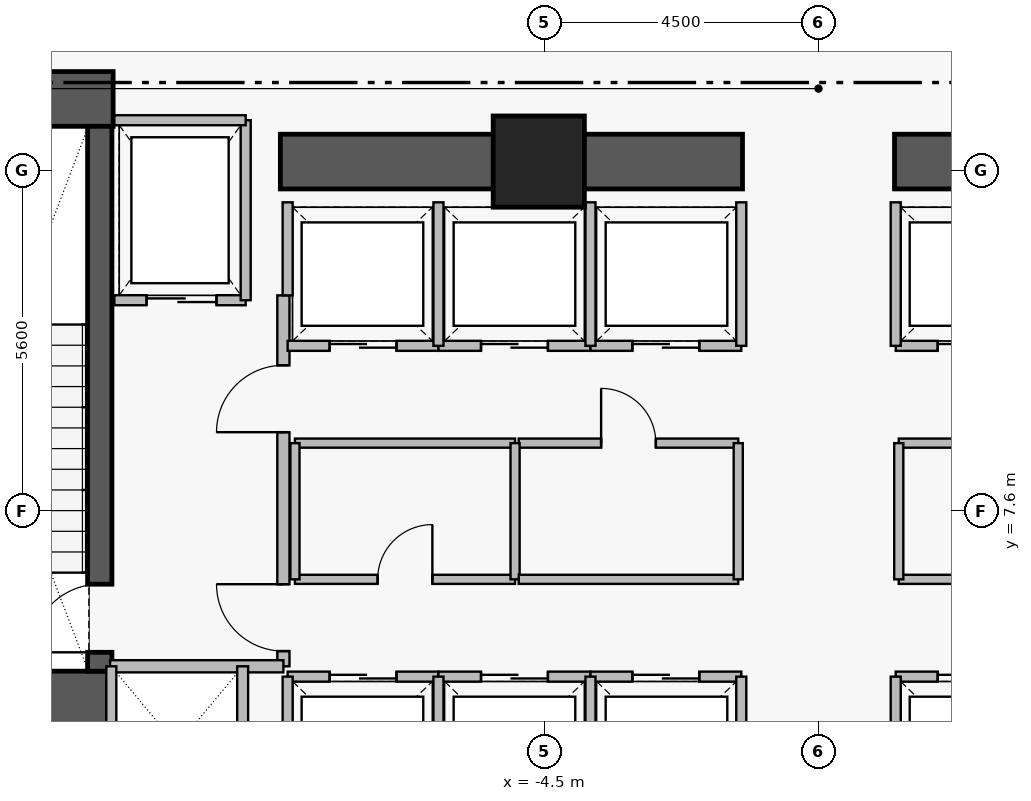
"""IFC4 building model, lengths in metres.
Left out: names, types, materials, properties, quantities, classifications, styles, units other than length and angle.
Written with IfcOpenShell. Run it as: python <this file> out.ifc"""

import sys

from ifc_helpers import new_model, si_unit, direction, frame, frame_2d, origin, origin_2d, place, context, subcontext, project, spatial, rectangle, extrude, element, fill, save


model = new_model("IFC4")
c1 = context("Model", 3, precision=1e-05, world=origin(), true_north=direction((0.0, 1.0)))
c2 = subcontext(c1, "Body", "Model", "MODEL_VIEW")
j1 = project(units=[si_unit("LENGTHUNIT", "METRE"), si_unit("PLANEANGLEUNIT", "RADIAN")], contexts=[c1])
p1 = place(None, origin())
s1 = spatial("IfcSite", under=j1, at=p1, CompositionType="ELEMENT")
p2 = place(p1, origin())
s2 = spatial("IfcBuilding", under=s1, at=p2, CompositionType="ELEMENT")
p3 = place(p2, frame((0.0, 0.0, 18.0)))
s3 = spatial("IfcBuildingStorey", under=s2, at=p3, CompositionType="ELEMENT", Elevation=18.0)
for number, where, z_axis, x_axis in (
    (1, (-16.31, 14.38, 0.0), (0.0, 0.0, 1.0), (1.0, 0.0, 0.0)),
    (2, (-16.31, 4.52, 0.0), (0.0, 0.0, 1.0), (1.0, 0.0, 0.0)),
):
    element("IfcWall", number, at=place(p3, frame(where, z_axis=z_axis, x_axis=x_axis)), inside=s3, PredefinedType="SHEAR", context=c2, shape_type="SweptSolid", body=[
        extrude(rectangle(XDim=4.71, YDim=0.9, at=frame_2d((2.355, 0.0))), origin(), (0.0, 0.0, 1.0), 4.61),
    ])
for number, where, z_axis, x_axis in (
    (3, (-8.85, 13.35, 0.0), (0.0, 0.0, 1.0), (1.0, 0.0, 0.0)),
    (4, (1.25, 13.35, 0.0), (0.0, 0.0, 1.0), (1.0, 0.0, 0.0)),
):
    element("IfcWall", number, at=place(p3, frame(where, z_axis=z_axis, x_axis=x_axis)), inside=s3, PredefinedType="SHEAR", context=c2, shape_type="SweptSolid", body=[
        extrude(rectangle(XDim=7.6, YDim=0.9, at=frame_2d((3.8, 0.0))), origin(), (0.0, 0.0, 1.0), 4.54),
    ])
p4 = place(p3, frame((-11.82, 4.97, 0.0), z_axis=(0.0, 0.0, 1.0), x_axis=(0.0, 1.0, 0.0)))
e5 = element("IfcWall", 5, at=p4, inside=s3, PredefinedType="SHEAR", context=c2, shape_type="SweptSolid", body=[
    extrude(rectangle(XDim=8.96, YDim=0.4, at=frame_2d((4.48, 0.0))), origin(), (0.0, 0.0, 1.0), 4.61),
])
p5 = place(p4, frame((0.31, 0.0, 0.0)))
e6 = element("IfcOpeningElement", 6, at=p5, cuts=e5, PredefinedType="OPENING", context=c2, shape_type="SweptSolid", body=[
    extrude(rectangle(XDim=1.12, YDim=2.22, at=frame_2d((0.56, 1.11))), frame((0.0, 0.21, 0.0), z_axis=(0.0, -1.0, 0.0), x_axis=(1.0, 0.0, 0.0)), (0.0, 0.0, 1.0), 0.42),
])
p6 = place(p3, frame((-4.6, 13.35, 0.0), z_axis=(0.0, 0.0, 1.0), x_axis=(1.0, 0.0, 0.0)))
e7 = element("IfcColumn", 7, at=p6, inside=s3, PredefinedType="COLUMN", context=c2, shape_type="SweptSolid", body=[
    extrude(rectangle(XDim=1.5, YDim=1.5, at=origin_2d()), origin(), (0.0, 0.0, 1.0), 4.8),
])
p7 = place(p3, frame((-8.8, 5.05, 0.0), z_axis=(0.0, 0.0, 1.0), x_axis=(0.0, 1.0, 0.0)))
e8 = element("IfcWall", 8, at=p7, inside=s3, PredefinedType="PARTITIONING", context=c2, shape_type="SweptSolid", body=[
    extrude(rectangle(XDim=6.1, YDim=0.2, at=frame_2d((3.05, 0.0))), origin(), (0.0, 0.0, 1.0), 4.54),
])
p8 = place(p7, frame((0.25, 0.0, 0.0)))
e9 = element("IfcOpeningElement", 9, at=p8, cuts=e8, PredefinedType="OPENING", context=c2, shape_type="SweptSolid", body=[
    extrude(rectangle(XDim=1.1, YDim=2.2, at=frame_2d((0.55, 1.1))), frame((0.0, 0.11, 0.0), z_axis=(0.0, -1.0, 0.0), x_axis=(1.0, 0.0, 0.0)), (0.0, 0.0, 1.0), 0.22),
])
p9 = place(p7, frame((3.85, 0.0, 0.0)))
e10 = element("IfcOpeningElement", 10, at=p9, cuts=e8, PredefinedType="OPENING", context=c2, shape_type="SweptSolid", body=[
    extrude(rectangle(XDim=1.1, YDim=2.2, at=frame_2d((0.55, 1.1))), frame((0.0, 0.11, 0.0), z_axis=(0.0, -1.0, 0.0), x_axis=(1.0, 0.0, 0.0)), (0.0, 0.0, 1.0), 0.22),
])
p10 = place(p3, frame((-11.58, 11.07, 0.0), z_axis=(0.0, 0.0, 1.0), x_axis=(1.0, 0.0, 0.0)))
e11 = element("IfcWall", 11, at=p10, inside=s3, PredefinedType="PARTITIONING", context=c2, shape_type="SweptSolid", body=[
    extrude(rectangle(XDim=2.16, YDim=0.165, at=frame_2d((1.08, 0.0))), origin(), (0.0, 0.0, 1.0), 4.54),
])
p11 = place(p10, frame((0.53, 0.0, 0.0)))
e12 = element("IfcOpeningElement", 12, at=p11, cuts=e11, PredefinedType="OPENING", context=c2, shape_type="SweptSolid", body=[
    extrude(rectangle(XDim=1.15, YDim=2.25, at=frame_2d((0.575, 1.125))), frame((0.0, 0.093, 0.0), z_axis=(0.0, -1.0, 0.0), x_axis=(1.0, 0.0, 0.0)), (0.0, 0.0, 1.0), 0.185),
])
p12 = place(p3, frame((-8.73, 4.88, 0.0), z_axis=(0.0, 0.0, 1.0), x_axis=(1.0, 0.0, 0.0)))
e13 = element("IfcWall", 13, at=p12, inside=s3, PredefinedType="PARTITIONING", context=c2, shape_type="SweptSolid", body=[
    extrude(rectangle(XDim=2.48, YDim=0.165, at=frame_2d((1.24, 0.0))), origin(), (0.0, 0.0, 1.0), 4.54),
])
p13 = place(p12, frame((0.69, 0.0, 0.0)))
e14 = element("IfcOpeningElement", 14, at=p13, cuts=e13, PredefinedType="OPENING", context=c2, shape_type="SweptSolid", body=[
    extrude(rectangle(XDim=1.1, YDim=2.25, at=frame_2d((0.55, 1.125))), frame((0.0, 0.093, 0.0), z_axis=(0.0, -1.0, 0.0), x_axis=(1.0, 0.0, 0.0)), (0.0, 0.0, 1.0), 0.185),
])
p14 = place(p3, frame((-6.25, 4.88, 0.0), z_axis=(0.0, 0.0, 1.0), x_axis=(1.0, 0.0, 0.0)))
e15 = element("IfcWall", 15, at=p14, inside=s3, PredefinedType="PARTITIONING", context=c2, shape_type="SweptSolid", body=[
    extrude(rectangle(XDim=2.5, YDim=0.165, at=frame_2d((1.25, 0.0))), origin(), (0.0, 0.0, 1.0), 4.54),
])
p15 = place(p14, frame((0.7, 0.0, 0.0)))
e16 = element("IfcOpeningElement", 16, at=p15, cuts=e15, PredefinedType="OPENING", context=c2, shape_type="SweptSolid", body=[
    extrude(rectangle(XDim=1.1, YDim=2.25, at=frame_2d((0.55, 1.125))), frame((0.0, 0.093, 0.0), z_axis=(0.0, -1.0, 0.0), x_axis=(1.0, 0.0, 0.0)), (0.0, 0.0, 1.0), 0.185),
])
p16 = place(p3, frame((-8.73, 10.32, 0.0), z_axis=(0.0, 0.0, 1.0), x_axis=(1.0, 0.0, 0.0)))
e17 = element("IfcWall", 17, at=p16, inside=s3, PredefinedType="PARTITIONING", context=c2, shape_type="SweptSolid", body=[
    extrude(rectangle(XDim=2.48, YDim=0.165, at=frame_2d((1.24, 0.0))), origin(), (0.0, 0.0, 1.0), 4.54),
])
p17 = place(p16, frame((0.69, 0.0, 0.0)))
e18 = element("IfcOpeningElement", 18, at=p17, cuts=e17, PredefinedType="OPENING", context=c2, shape_type="SweptSolid", body=[
    extrude(rectangle(XDim=1.1, YDim=2.25, at=frame_2d((0.55, 1.125))), frame((0.0, 0.093, 0.0), z_axis=(0.0, -1.0, 0.0), x_axis=(1.0, 0.0, 0.0)), (0.0, 0.0, 1.0), 0.185),
])
p18 = place(p3, frame((-6.25, 10.32, 0.0), z_axis=(0.0, 0.0, 1.0), x_axis=(1.0, 0.0, 0.0)))
e19 = element("IfcWall", 19, at=p18, inside=s3, PredefinedType="PARTITIONING", context=c2, shape_type="SweptSolid", body=[
    extrude(rectangle(XDim=2.5, YDim=0.165, at=frame_2d((1.25, 0.0))), origin(), (0.0, 0.0, 1.0), 4.54),
])
p19 = place(p18, frame((0.7, 0.0, 0.0)))
e20 = element("IfcOpeningElement", 20, at=p19, cuts=e19, PredefinedType="OPENING", context=c2, shape_type="SweptSolid", body=[
    extrude(rectangle(XDim=1.1, YDim=2.25, at=frame_2d((0.55, 1.125))), frame((0.0, 0.093, 0.0), z_axis=(0.0, -1.0, 0.0), x_axis=(1.0, 0.0, 0.0)), (0.0, 0.0, 1.0), 0.185),
])
p20 = place(p3, frame((-3.75, 4.88, 0.0), z_axis=(0.0, 0.0, 1.0), x_axis=(1.0, 0.0, 0.0)))
e21 = element("IfcWall", 21, at=p20, inside=s3, PredefinedType="PARTITIONING", context=c2, shape_type="SweptSolid", body=[
    extrude(rectangle(XDim=2.48, YDim=0.165, at=frame_2d((1.24, 0.0))), origin(), (0.0, 0.0, 1.0), 4.54),
])
p21 = place(p20, frame((0.69, 0.0, 0.0)))
e22 = element("IfcOpeningElement", 22, at=p21, cuts=e21, PredefinedType="OPENING", context=c2, shape_type="SweptSolid", body=[
    extrude(rectangle(XDim=1.1, YDim=2.25, at=frame_2d((0.55, 1.125))), frame((0.0, 0.093, 0.0), z_axis=(0.0, -1.0, 0.0), x_axis=(1.0, 0.0, 0.0)), (0.0, 0.0, 1.0), 0.185),
])
p22 = place(p3, frame((1.27, 4.88, 0.0), z_axis=(0.0, 0.0, 1.0), x_axis=(1.0, 0.0, 0.0)))
e23 = element("IfcWall", 23, at=p22, inside=s3, PredefinedType="PARTITIONING", context=c2, shape_type="SweptSolid", body=[
    extrude(rectangle(XDim=2.48, YDim=0.165, at=frame_2d((1.24, 0.0))), origin(), (0.0, 0.0, 1.0), 4.54),
])
p23 = place(p22, frame((0.69, 0.0, 0.0)))
e24 = element("IfcOpeningElement", 24, at=p23, cuts=e23, PredefinedType="OPENING", context=c2, shape_type="SweptSolid", body=[
    extrude(rectangle(XDim=1.1, YDim=2.25, at=frame_2d((0.55, 1.125))), frame((0.0, 0.093, 0.0), z_axis=(0.0, -1.0, 0.0), x_axis=(1.0, 0.0, 0.0)), (0.0, 0.0, 1.0), 0.185),
])
p24 = place(p3, frame((-3.75, 10.32, 0.0), z_axis=(0.0, 0.0, 1.0), x_axis=(1.0, 0.0, 0.0)))
e25 = element("IfcWall", 25, at=p24, inside=s3, PredefinedType="PARTITIONING", context=c2, shape_type="SweptSolid", body=[
    extrude(rectangle(XDim=2.48, YDim=0.165, at=frame_2d((1.24, 0.0))), origin(), (0.0, 0.0, 1.0), 4.54),
])
p25 = place(p24, frame((0.69, 0.0, 0.0)))
e26 = element("IfcOpeningElement", 26, at=p25, cuts=e25, PredefinedType="OPENING", context=c2, shape_type="SweptSolid", body=[
    extrude(rectangle(XDim=1.1, YDim=2.25, at=frame_2d((0.55, 1.125))), frame((0.0, 0.093, 0.0), z_axis=(0.0, -1.0, 0.0), x_axis=(1.0, 0.0, 0.0)), (0.0, 0.0, 1.0), 0.185),
])
p26 = place(p3, frame((1.27, 10.32, 0.0), z_axis=(0.0, 0.0, 1.0), x_axis=(1.0, 0.0, 0.0)))
e27 = element("IfcWall", 27, at=p26, inside=s3, PredefinedType="PARTITIONING", context=c2, shape_type="SweptSolid", body=[
    extrude(rectangle(XDim=2.48, YDim=0.165, at=frame_2d((1.24, 0.0))), origin(), (0.0, 0.0, 1.0), 4.54),
])
p27 = place(p26, frame((0.69, 0.0, 0.0)))
e28 = element("IfcOpeningElement", 28, at=p27, cuts=e27, PredefinedType="OPENING", context=c2, shape_type="SweptSolid", body=[
    extrude(rectangle(XDim=1.1, YDim=2.25, at=frame_2d((0.55, 1.125))), frame((0.0, 0.093, 0.0), z_axis=(0.0, -1.0, 0.0), x_axis=(1.0, 0.0, 0.0)), (0.0, 0.0, 1.0), 0.185),
])
p28 = place(p3, frame((-8.61, 6.48, 0.0), z_axis=(0.0, 0.0, 1.0), x_axis=(1.0, 0.0, 0.0)))
e29 = element("IfcWall", 29, at=p28, inside=s3, PredefinedType="PARTITIONING", context=c2, shape_type="SweptSolid", body=[
    extrude(rectangle(XDim=3.62, YDim=0.15, at=frame_2d((1.81, 0.0))), origin(), (0.0, 0.0, 1.0), 4.54),
])
p29 = place(p28, frame((1.36, 0.0, 0.0)))
e30 = element("IfcOpeningElement", 30, at=p29, cuts=e29, PredefinedType="OPENING", context=c2, shape_type="SweptSolid", body=[
    extrude(rectangle(XDim=0.9, YDim=2.15, at=frame_2d((0.45, 1.075))), frame((0.0, 0.085, 0.0), z_axis=(0.0, -1.0, 0.0), x_axis=(1.0, 0.0, 0.0)), (0.0, 0.0, 1.0), 0.17),
])
p30 = place(p3, frame((-4.93, 8.72, 0.0), z_axis=(0.0, 0.0, 1.0), x_axis=(1.0, 0.0, 0.0)))
e31 = element("IfcWall", 31, at=p30, inside=s3, PredefinedType="PARTITIONING", context=c2, shape_type="SweptSolid", body=[
    extrude(rectangle(XDim=3.61, YDim=0.15, at=frame_2d((1.805, 0.0))), origin(), (0.0, 0.0, 1.0), 4.54),
])
p31 = place(p30, frame((1.355, 0.0, 0.0)))
e32 = element("IfcOpeningElement", 32, at=p31, cuts=e31, PredefinedType="OPENING", context=c2, shape_type="SweptSolid", body=[
    extrude(rectangle(XDim=0.9, YDim=2.15, at=frame_2d((0.45, 1.075))), frame((0.0, 0.085, 0.0), z_axis=(0.0, -1.0, 0.0), x_axis=(1.0, 0.0, 0.0)), (0.0, 0.0, 1.0), 0.17),
])
p32 = place(p3, frame((1.32, 6.48, 0.0), z_axis=(0.0, 0.0, 1.0), x_axis=(1.0, 0.0, 0.0)))
e33 = element("IfcWall", 33, at=p32, inside=s3, PredefinedType="PARTITIONING", context=c2, shape_type="SweptSolid", body=[
    extrude(rectangle(XDim=4.49, YDim=0.15, at=frame_2d((2.245, 0.0))), origin(), (0.0, 0.0, 1.0), 4.54),
])
p33 = place(p32, frame((1.795, 0.0, 0.0)))
e34 = element("IfcOpeningElement", 34, at=p33, cuts=e33, PredefinedType="OPENING", context=c2, shape_type="SweptSolid", body=[
    extrude(rectangle(XDim=0.9, YDim=2.15, at=frame_2d((0.45, 1.075))), frame((0.0, 0.085, 0.0), z_axis=(0.0, -1.0, 0.0), x_axis=(1.0, 0.0, 0.0)), (0.0, 0.0, 1.0), 0.17),
])
p34 = place(p3, frame((-11.65, 5.05, 0.0), z_axis=(0.0, 0.0, 1.0), x_axis=(1.0, 0.0, 0.0)))
e35 = element("IfcWall", 35, at=p34, inside=s3, PredefinedType="PARTITIONING", context=c2, shape_type="SweptSolid", body=[
    extrude(rectangle(XDim=2.85, YDim=0.2, at=frame_2d((1.425, 0.0))), origin(), (0.0, 0.0, 1.0), 4.54),
])
p35 = place(p3, frame((-9.42, 11.07, 0.0), z_axis=(0.0, 0.0, 1.0), x_axis=(0.0, 1.0, 0.0)))
e36 = element("IfcWall", 36, at=p35, inside=s3, PredefinedType="PARTITIONING", context=c2, shape_type="SweptSolid", body=[
    extrude(rectangle(XDim=2.96, YDim=0.165, at=frame_2d((1.48, 0.0))), origin(), (0.0, 0.0, 1.0), 4.54),
])
p36 = place(p3, frame((-11.58, 14.03, 0.0), z_axis=(0.0, 0.0, 1.0), x_axis=(1.0, 0.0, 0.0)))
e37 = element("IfcWall", 37, at=p36, inside=s3, PredefinedType="PARTITIONING", context=c2, shape_type="SweptSolid", body=[
    extrude(rectangle(XDim=2.16, YDim=0.165, at=frame_2d((1.08, 0.0))), origin(), (0.0, 0.0, 1.0), 4.54),
])
for number, where, z_axis, x_axis in (
    (38, (-8.73, 2.52, 0.0), (0.0, 0.0, 1.0), (0.0, 1.0, 0.0)),
    (39, (-6.25, 2.52, 0.0), (0.0, 0.0, 1.0), (0.0, 1.0, 0.0)),
    (40, (-3.75, 2.52, 0.0), (0.0, 0.0, 1.0), (0.0, 1.0, 0.0)),
):
    element("IfcWall", number, at=place(p3, frame(where, z_axis=z_axis, x_axis=x_axis)), inside=s3, PredefinedType="PARTITIONING", context=c2, shape_type="SweptSolid", body=[
        extrude(rectangle(XDim=2.36, YDim=0.165, at=frame_2d((1.18, 0.0))), origin(), (0.0, 0.0, 1.0), 4.54),
    ])
p37 = place(p3, frame((-8.73, 11.15, 0.0), z_axis=(0.0, 0.0, 1.0), x_axis=(0.0, 1.0, 0.0)))
e41 = element("IfcWall", 41, at=p37, inside=s3, PredefinedType="PARTITIONING", context=c2, shape_type="SweptSolid", body=[
    extrude(rectangle(XDim=1.53, YDim=0.165, at=frame_2d((0.765, 0.0))), origin(), (0.0, 0.0, 1.0), 4.54),
])
for number, where, z_axis, x_axis in (
    (42, (-6.25, 10.32, 0.0), (0.0, 0.0, 1.0), (0.0, 1.0, 0.0)),
    (43, (-3.75, 10.32, 0.0), (0.0, 0.0, 1.0), (0.0, 1.0, 0.0)),
    (44, (-1.27, 2.52, 0.0), (0.0, 0.0, 1.0), (0.0, 1.0, 0.0)),
    (45, (1.27, 2.52, 0.0), (0.0, 0.0, 1.0), (0.0, 1.0, 0.0)),
    (46, (-1.27, 10.32, 0.0), (0.0, 0.0, 1.0), (0.0, 1.0, 0.0)),
    (47, (1.27, 10.32, 0.0), (0.0, 0.0, 1.0), (0.0, 1.0, 0.0)),
):
    element("IfcWall", number, at=place(p3, frame(where, z_axis=z_axis, x_axis=x_axis)), inside=s3, PredefinedType="PARTITIONING", context=c2, shape_type="SweptSolid", body=[
        extrude(rectangle(XDim=2.36, YDim=0.165, at=frame_2d((1.18, 0.0))), origin(), (0.0, 0.0, 1.0), 4.54),
    ])
p38 = place(p3, frame((-9.47, 2.45, 0.0), z_axis=(0.0, 0.0, 1.0), x_axis=(0.0, 1.0, 0.0)))
e48 = element("IfcWall", 48, at=p38, inside=s3, PredefinedType="PARTITIONING", context=c2, shape_type="SweptSolid", body=[
    extrude(rectangle(XDim=2.6, YDim=0.18, at=frame_2d((1.3, 0.0))), origin(), (0.0, 0.0, 1.0), 4.54),
])
p39 = place(p3, frame((-11.63, 2.47, 0.0), z_axis=(0.0, 0.0, 1.0), x_axis=(0.0, 1.0, 0.0)))
e49 = element("IfcWall", 49, at=p39, inside=s3, PredefinedType="PARTITIONING", context=c2, shape_type="SweptSolid", body=[
    extrude(rectangle(XDim=2.58, YDim=0.165, at=frame_2d((1.29, 0.0))), origin(), (0.0, 0.0, 1.0), 4.54),
])
p40 = place(p3, frame((-8.61, 8.72, 0.0), z_axis=(0.0, 0.0, 1.0), x_axis=(1.0, 0.0, 0.0)))
e50 = element("IfcWall", 50, at=p40, inside=s3, PredefinedType="PARTITIONING", context=c2, shape_type="SweptSolid", body=[
    extrude(rectangle(XDim=3.62, YDim=0.15, at=frame_2d((1.81, 0.0))), origin(), (0.0, 0.0, 1.0), 4.54),
])
for number, where, z_axis, x_axis in (
    (51, (-8.61, 6.48, 0.0), (0.0, 0.0, 1.0), (0.0, 1.0, 0.0)),
    (52, (-4.99, 6.48, 0.0), (0.0, 0.0, 1.0), (0.0, 1.0, 0.0)),
):
    element("IfcWall", number, at=place(p3, frame(where, z_axis=z_axis, x_axis=x_axis)), inside=s3, PredefinedType="PARTITIONING", context=c2, shape_type="SweptSolid", body=[
        extrude(rectangle(XDim=2.24, YDim=0.15, at=frame_2d((1.12, 0.0))), origin(), (0.0, 0.0, 1.0), 4.54),
    ])
p41 = place(p3, frame((-4.93, 6.48, 0.0), z_axis=(0.0, 0.0, 1.0), x_axis=(1.0, 0.0, 0.0)))
e53 = element("IfcWall", 53, at=p41, inside=s3, PredefinedType="PARTITIONING", context=c2, shape_type="SweptSolid", body=[
    extrude(rectangle(XDim=3.61, YDim=0.15, at=frame_2d((1.805, 0.0))), origin(), (0.0, 0.0, 1.0), 4.54),
])
p42 = place(p3, frame((-1.32, 6.48, 0.0), z_axis=(0.0, 0.0, 1.0), x_axis=(0.0, 1.0, 0.0)))
e54 = element("IfcWall", 54, at=p42, inside=s3, PredefinedType="PARTITIONING", context=c2, shape_type="SweptSolid", body=[
    extrude(rectangle(XDim=2.24, YDim=0.15, at=frame_2d((1.12, 0.0))), origin(), (0.0, 0.0, 1.0), 4.54),
])
p43 = place(p3, frame((1.32, 8.72, 0.0), z_axis=(0.0, 0.0, 1.0), x_axis=(1.0, 0.0, 0.0)))
e55 = element("IfcWall", 55, at=p43, inside=s3, PredefinedType="PARTITIONING", context=c2, shape_type="SweptSolid", body=[
    extrude(rectangle(XDim=4.49, YDim=0.15, at=frame_2d((2.245, 0.0))), origin(), (0.0, 0.0, 1.0), 4.54),
])
p44 = place(p3, frame((1.32, 6.48, 0.0), z_axis=(0.0, 0.0, 1.0), x_axis=(0.0, 1.0, 0.0)))
e56 = element("IfcWall", 56, at=p44, inside=s3, PredefinedType="PARTITIONING", context=c2, shape_type="SweptSolid", body=[
    extrude(rectangle(XDim=2.24, YDim=0.15, at=frame_2d((1.12, 0.0))), origin(), (0.0, 0.0, 1.0), 4.54),
])
p45 = place(p5, origin())
e57 = element("IfcDoor", 57, at=p45, inside=s3, OperationType="SINGLE_SWING_LEFT", PredefinedType="DOOR", context=c2, shape_type="SweptSolid", body=[
    extrude(rectangle(XDim=1.12, YDim=2.22, at=frame_2d((0.56, 1.11))), frame((0.0, 0.025, 0.0), z_axis=(0.0, -1.0, 0.0), x_axis=(1.0, 0.0, 0.0)), (0.0, 0.0, 1.0), 0.05),
])
fill(e6, e57)
p46 = place(p8, origin())
e58 = element("IfcDoor", 58, at=p46, inside=s3, OperationType="SINGLE_SWING_RIGHT", PredefinedType="DOOR", context=c2, shape_type="SweptSolid", body=[
    extrude(rectangle(XDim=1.1, YDim=2.2, at=frame_2d((0.55, 1.1))), frame((0.0, 0.025, 0.0), z_axis=(0.0, -1.0, 0.0), x_axis=(1.0, 0.0, 0.0)), (0.0, 0.0, 1.0), 0.05),
])
fill(e9, e58)
p47 = place(p9, origin())
e59 = element("IfcDoor", 59, at=p47, inside=s3, OperationType="SINGLE_SWING_LEFT", PredefinedType="DOOR", context=c2, shape_type="SweptSolid", body=[
    extrude(rectangle(XDim=1.1, YDim=2.2, at=frame_2d((0.55, 1.1))), frame((0.0, 0.025, 0.0), z_axis=(0.0, -1.0, 0.0), x_axis=(1.0, 0.0, 0.0)), (0.0, 0.0, 1.0), 0.05),
])
fill(e10, e59)
p48 = place(p11, origin())
e60 = element("IfcDoor", 60, at=p48, inside=s3, OperationType="SLIDING_TO_LEFT", PredefinedType="DOOR", context=c2, shape_type="SweptSolid", body=[
    extrude(rectangle(XDim=1.15, YDim=2.25, at=frame_2d((0.575, 1.125))), frame((0.0, 0.025, 0.0), z_axis=(0.0, -1.0, 0.0), x_axis=(1.0, 0.0, 0.0)), (0.0, 0.0, 1.0), 0.05),
])
fill(e12, e60)
p49 = place(p13, origin())
e61 = element("IfcDoor", 61, at=p49, inside=s3, OperationType="SLIDING_TO_LEFT", PredefinedType="DOOR", context=c2, shape_type="SweptSolid", body=[
    extrude(rectangle(XDim=1.1, YDim=2.25, at=frame_2d((0.55, 1.125))), frame((0.0, 0.025, 0.0), z_axis=(0.0, -1.0, 0.0), x_axis=(1.0, 0.0, 0.0)), (0.0, 0.0, 1.0), 0.05),
])
fill(e14, e61)
p50 = place(p15, origin())
e62 = element("IfcDoor", 62, at=p50, inside=s3, OperationType="SLIDING_TO_LEFT", PredefinedType="DOOR", context=c2, shape_type="SweptSolid", body=[
    extrude(rectangle(XDim=1.1, YDim=2.25, at=frame_2d((0.55, 1.125))), frame((0.0, 0.025, 0.0), z_axis=(0.0, -1.0, 0.0), x_axis=(1.0, 0.0, 0.0)), (0.0, 0.0, 1.0), 0.05),
])
fill(e16, e62)
p51 = place(p17, origin())
e63 = element("IfcDoor", 63, at=p51, inside=s3, OperationType="SLIDING_TO_LEFT", PredefinedType="DOOR", context=c2, shape_type="SweptSolid", body=[
    extrude(rectangle(XDim=1.1, YDim=2.25, at=frame_2d((0.55, 1.125))), frame((0.0, 0.025, 0.0), z_axis=(0.0, -1.0, 0.0), x_axis=(1.0, 0.0, 0.0)), (0.0, 0.0, 1.0), 0.05),
])
fill(e18, e63)
p52 = place(p19, origin())
e64 = element("IfcDoor", 64, at=p52, inside=s3, OperationType="SLIDING_TO_LEFT", PredefinedType="DOOR", context=c2, shape_type="SweptSolid", body=[
    extrude(rectangle(XDim=1.1, YDim=2.25, at=frame_2d((0.55, 1.125))), frame((0.0, 0.025, 0.0), z_axis=(0.0, -1.0, 0.0), x_axis=(1.0, 0.0, 0.0)), (0.0, 0.0, 1.0), 0.05),
])
fill(e20, e64)
p53 = place(p21, origin())
e65 = element("IfcDoor", 65, at=p53, inside=s3, OperationType="SLIDING_TO_LEFT", PredefinedType="DOOR", context=c2, shape_type="SweptSolid", body=[
    extrude(rectangle(XDim=1.1, YDim=2.25, at=frame_2d((0.55, 1.125))), frame((0.0, 0.025, 0.0), z_axis=(0.0, -1.0, 0.0), x_axis=(1.0, 0.0, 0.0)), (0.0, 0.0, 1.0), 0.05),
])
fill(e22, e65)
p54 = place(p23, origin())
e66 = element("IfcDoor", 66, at=p54, inside=s3, OperationType="SLIDING_TO_LEFT", PredefinedType="DOOR", context=c2, shape_type="SweptSolid", body=[
    extrude(rectangle(XDim=1.1, YDim=2.25, at=frame_2d((0.55, 1.125))), frame((0.0, 0.025, 0.0), z_axis=(0.0, -1.0, 0.0), x_axis=(1.0, 0.0, 0.0)), (0.0, 0.0, 1.0), 0.05),
])
fill(e24, e66)
p55 = place(p25, origin())
e67 = element("IfcDoor", 67, at=p55, inside=s3, OperationType="SLIDING_TO_LEFT", PredefinedType="DOOR", context=c2, shape_type="SweptSolid", body=[
    extrude(rectangle(XDim=1.1, YDim=2.25, at=frame_2d((0.55, 1.125))), frame((0.0, 0.025, 0.0), z_axis=(0.0, -1.0, 0.0), x_axis=(1.0, 0.0, 0.0)), (0.0, 0.0, 1.0), 0.05),
])
fill(e26, e67)
p56 = place(p27, origin())
e68 = element("IfcDoor", 68, at=p56, inside=s3, OperationType="SLIDING_TO_LEFT", PredefinedType="DOOR", context=c2, shape_type="SweptSolid", body=[
    extrude(rectangle(XDim=1.1, YDim=2.25, at=frame_2d((0.55, 1.125))), frame((0.0, 0.025, 0.0), z_axis=(0.0, -1.0, 0.0), x_axis=(1.0, 0.0, 0.0)), (0.0, 0.0, 1.0), 0.05),
])
fill(e28, e68)
p57 = place(p29, origin())
e69 = element("IfcDoor", 69, at=p57, inside=s3, OperationType="SINGLE_SWING_RIGHT", PredefinedType="DOOR", context=c2, shape_type="SweptSolid", body=[
    extrude(rectangle(XDim=0.9, YDim=2.15, at=frame_2d((0.45, 1.075))), frame((0.0, 0.025, 0.0), z_axis=(0.0, -1.0, 0.0), x_axis=(1.0, 0.0, 0.0)), (0.0, 0.0, 1.0), 0.05),
])
fill(e30, e69)
p58 = place(p31, origin())
e70 = element("IfcDoor", 70, at=p58, inside=s3, OperationType="SINGLE_SWING_LEFT", PredefinedType="DOOR", context=c2, shape_type="SweptSolid", body=[
    extrude(rectangle(XDim=0.9, YDim=2.15, at=frame_2d((0.45, 1.075))), frame((0.0, 0.025, 0.0), z_axis=(0.0, -1.0, 0.0), x_axis=(1.0, 0.0, 0.0)), (0.0, 0.0, 1.0), 0.05),
])
fill(e32, e70)
save(model, sys.argv[1])
